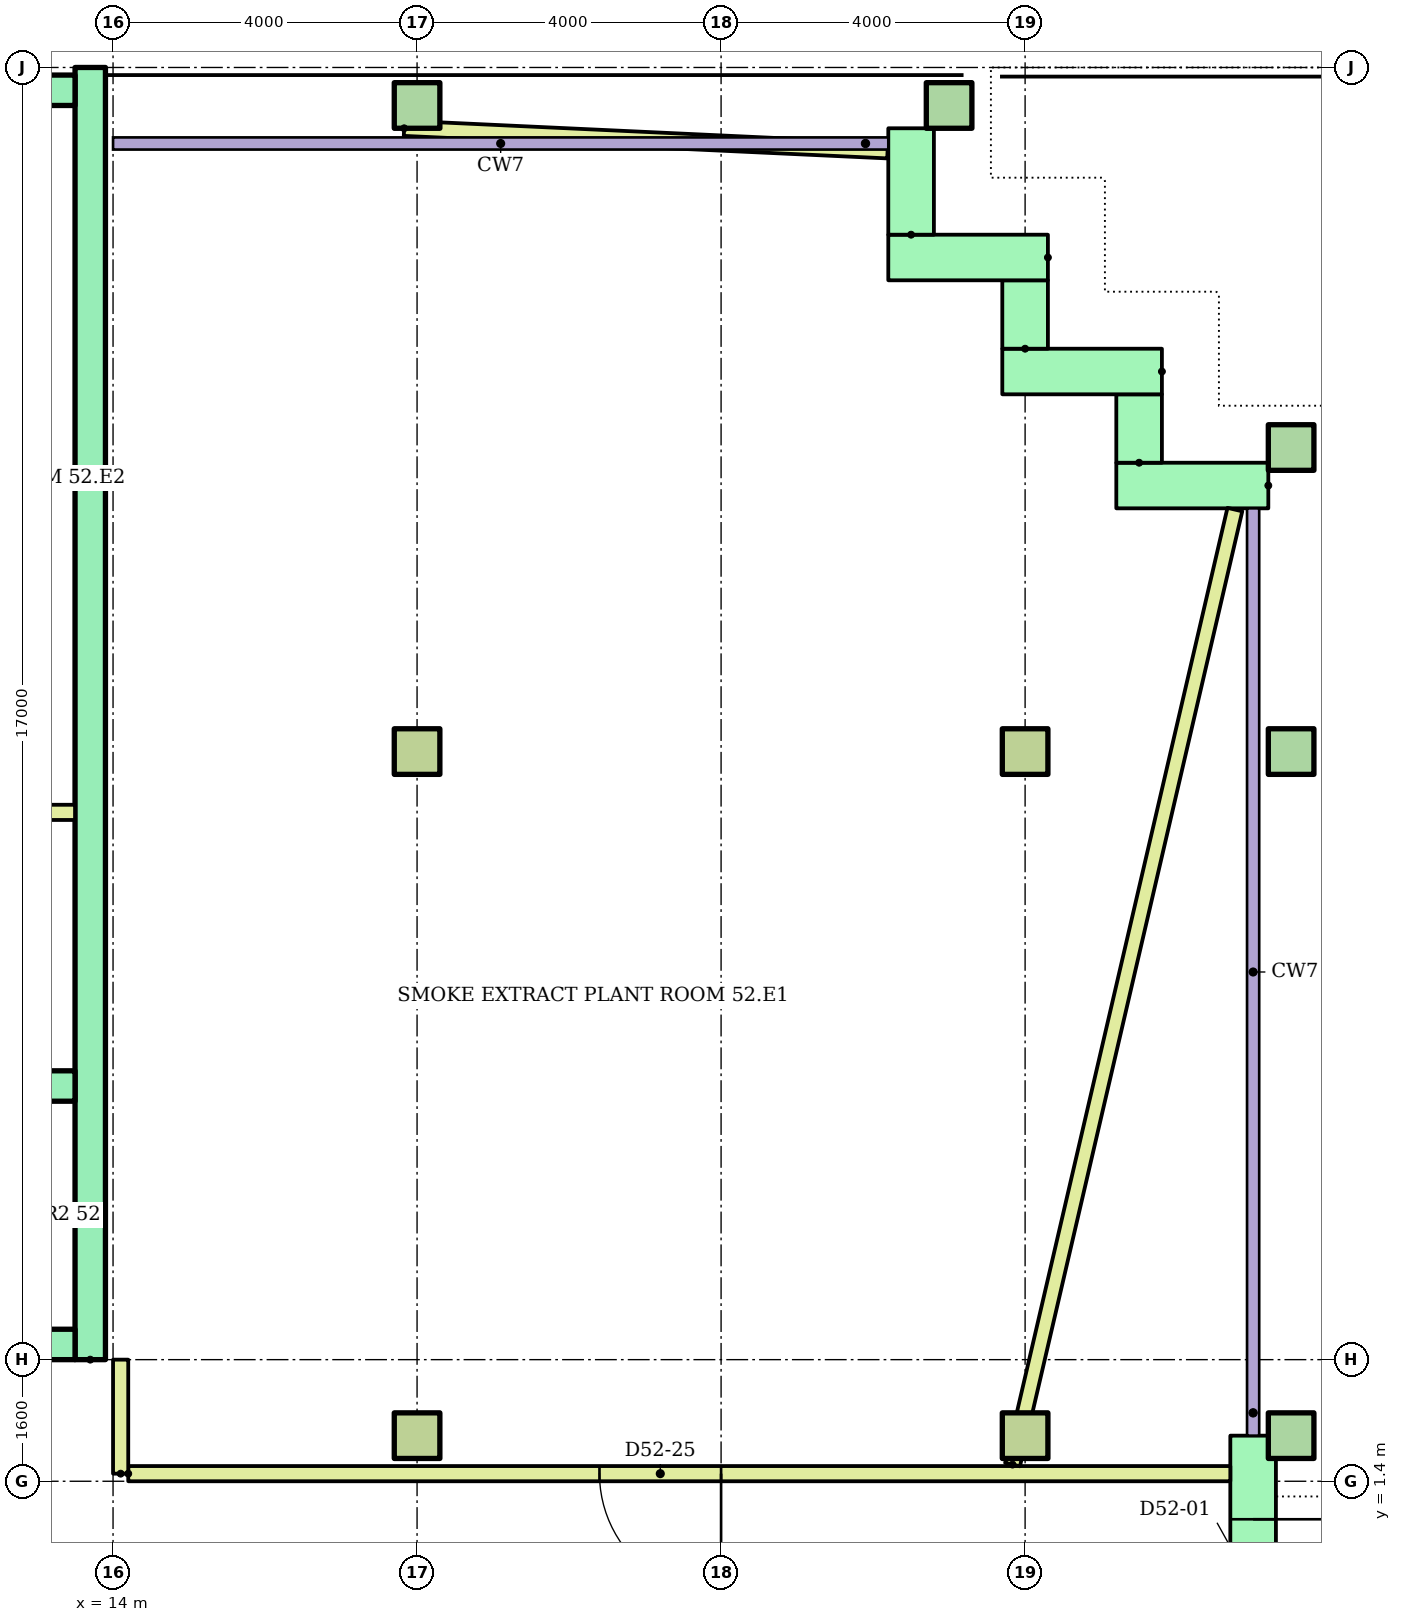
"""IFC4 building model, lengths in metres.
Left out: names, types, materials, properties, quantities, classifications, styles, units other than length and angle.
Written with IfcOpenShell. Run it as: python <this file> out.ifc"""

import sys

from ifc_helpers import new_model, si_unit, direction, frame, frame_2d, origin, origin_2d, place, context, subcontext, project, spatial, rectangle, hollow_rectangle, extrude, element, fill, save


model = new_model("IFC4")
c1 = context("Model", 3, precision=1e-05, world=origin(), true_north=direction((0.0, 1.0)))
c2 = subcontext(c1, "Body", "Model", "MODEL_VIEW")
j1 = project(units=[si_unit("LENGTHUNIT", "METRE"), si_unit("PLANEANGLEUNIT", "RADIAN")], contexts=[c1])
p1 = place(None, origin())
s1 = spatial("IfcSite", under=j1, at=p1, CompositionType="ELEMENT")
p2 = place(p1, origin())
s2 = spatial("IfcBuilding", under=s1, at=p2, CompositionType="ELEMENT")
p3 = place(p2, frame((0.0, 0.0, 203.7)))
s3 = spatial("IfcBuildingStorey", under=s2, at=p3, CompositionType="ELEMENT", Elevation=203.7)
for number, where in (
    (1, (18.0, 2.0, 0.0)),
    (2, (26.0, 2.0, 0.0)),
):
    element("IfcColumn", number, at=place(p3, frame(where)), inside=s3, PredefinedType="COLUMN", context=c2, shape_type="SweptSolid", body=[
        extrude(rectangle(XDim=0.6, YDim=0.6, at=origin_2d()), origin(), (0.0, 0.0, 1.0), 3.9),
    ])
p4 = place(p3, frame((29.5, 2.0, 0.0)))
e3 = element("IfcColumn", 3, at=p4, inside=s3, PredefinedType="COLUMN", context=c2, shape_type="SweptSolid", body=[
    extrude(hollow_rectangle(XDim=0.6, YDim=0.6, WallThickness=0.03, at=origin_2d()), origin(), (0.0, 0.0, 1.0), 3.9),
])
for number, where in (
    (4, (18.0, 11.0, 0.0)),
    (5, (26.0, 11.0, 0.0)),
):
    element("IfcColumn", number, at=place(p3, frame(where)), inside=s3, PredefinedType="COLUMN", context=c2, shape_type="SweptSolid", body=[
        extrude(rectangle(XDim=0.6, YDim=0.6, at=origin_2d()), origin(), (0.0, 0.0, 1.0), 3.9),
    ])
for number, where in (
    (6, (29.5, 11.0, 0.0)),
    (7, (29.5, 15.0, 0.0)),
    (8, (18.0, 19.5, 0.0)),
    (9, (25.0, 19.5, 0.0)),
):
    element("IfcColumn", number, at=place(p3, frame(where)), inside=s3, PredefinedType="COLUMN", context=c2, shape_type="SweptSolid", body=[
        extrude(hollow_rectangle(XDim=0.6, YDim=0.6, WallThickness=0.03, at=origin_2d()), origin(), (0.0, 0.0, 1.0), 3.9),
    ])
p5 = place(p3, frame((29.2, 14.5, 0.0), z_axis=(0.0, 0.0, 1.0), x_axis=(-1.0, 0.0, 0.0)))
e10 = element("IfcWall", 10, at=p5, inside=s3, PredefinedType="STANDARD", context=c2, shape_type="SweptSolid", body=[
    extrude(rectangle(XDim=2.0, YDim=0.6, at=frame_2d((1.0, 0.0))), origin(), (0.0, 0.0, 1.0), 3.62),
])
p6 = place(p3, frame((27.5, 14.8, 0.0), z_axis=(0.0, 0.0, 1.0), x_axis=(0.0, 1.0, 0.0)))
e11 = element("IfcWall", 11, at=p6, inside=s3, PredefinedType="STANDARD", context=c2, shape_type="SweptSolid", body=[
    extrude(rectangle(XDim=0.9, YDim=0.6, at=frame_2d((0.45, 0.0))), origin(), (0.0, 0.0, 1.0), 3.62),
])
p7 = place(p3, frame((27.8, 16.0, 0.0), z_axis=(0.0, 0.0, 1.0), x_axis=(-1.0, 0.0, 0.0)))
e12 = element("IfcWall", 12, at=p7, inside=s3, PredefinedType="STANDARD", context=c2, shape_type="SweptSolid", body=[
    extrude(rectangle(XDim=2.1, YDim=0.6, at=frame_2d((1.05, 0.0))), origin(), (0.0, 0.0, 1.0), 3.62),
])
p8 = place(p3, frame((26.0, 16.3, 0.0), z_axis=(0.0, 0.0, 1.0), x_axis=(0.0, 1.0, 0.0)))
e13 = element("IfcWall", 13, at=p8, inside=s3, PredefinedType="STANDARD", context=c2, shape_type="SweptSolid", body=[
    extrude(rectangle(XDim=0.9, YDim=0.6, at=frame_2d((0.45, 0.0))), origin(), (0.0, 0.0, 1.0), 3.62),
])
p9 = place(p3, frame((26.3, 17.5, 0.0), z_axis=(0.0, 0.0, 1.0), x_axis=(-1.0, 0.0, 0.0)))
e14 = element("IfcWall", 14, at=p9, inside=s3, PredefinedType="STANDARD", context=c2, shape_type="SweptSolid", body=[
    extrude(rectangle(XDim=2.1, YDim=0.6, at=frame_2d((1.05, 0.0))), origin(), (0.0, 0.0, 1.0), 3.62),
])
p10 = place(p3, frame((24.5, 17.8, 0.0), z_axis=(0.0, 0.0, 1.0), x_axis=(0.0, 1.0, 0.0)))
e15 = element("IfcWall", 15, at=p10, inside=s3, PredefinedType="STANDARD", context=c2, shape_type="SweptSolid", body=[
    extrude(rectangle(XDim=1.4, YDim=0.6, at=frame_2d((0.7, 0.0))), origin(), (0.0, 0.0, 1.0), 3.62),
])
p11 = place(p3, frame((29.0, -2.0, 0.0), z_axis=(0.0, 0.0, 1.0), x_axis=(0.0, 1.0, 0.0)))
e16 = element("IfcWall", 16, at=p11, inside=s3, PredefinedType="STANDARD", context=c2, shape_type="SweptSolid", body=[
    extrude(rectangle(XDim=4.0, YDim=0.6, at=frame_2d((2.0, 0.0))), origin(), (0.0, 0.0, 1.0), 3.62),
])
p12 = place(p11, frame((1.1, 0.0, 0.0)))
e17 = element("IfcOpeningElement", 17, at=p12, cuts=e16, PredefinedType="OPENING", context=c2, shape_type="SweptSolid", body=[
    extrude(rectangle(XDim=1.8, YDim=2.1, at=frame_2d((0.9, 1.05))), frame((0.0, 0.31, 0.0), z_axis=(0.0, -1.0, 0.0), x_axis=(1.0, 0.0, 0.0)), (0.0, 0.0, 1.0), 0.62),
])
p13 = place(p3, frame((13.7, 3.0, 0.0), z_axis=(0.0, 0.0, 1.0), x_axis=(0.0, 1.0, 0.0)))
e18 = element("IfcWall", 18, at=p13, inside=s3, PredefinedType="SHEAR", context=c2, shape_type="SweptSolid", body=[
    extrude(rectangle(XDim=17.0, YDim=0.4, at=frame_2d((8.5, 0.0))), origin(), (0.0, 0.0, 1.0), 3.62),
])
p14 = place(p3, frame((-13.5, 19.7, 0.0)))
e19 = element("IfcWall", 19, at=p14, inside=s3, PredefinedType="SHEAR", context=c2, shape_type="SweptSolid", body=[
    extrude(rectangle(XDim=27.0, YDim=0.4, at=frame_2d((13.5, 0.0))), origin(), (0.0, 0.0, 1.0), 3.62),
])
p15 = place(p3, frame((-13.5, 3.2, 0.0)))
e20 = element("IfcWall", 20, at=p15, inside=s3, PredefinedType="SHEAR", context=c2, shape_type="SweptSolid", body=[
    extrude(rectangle(XDim=27.0, YDim=0.4, at=frame_2d((13.5, 0.0))), origin(), (0.0, 0.0, 1.0), 3.62),
])
p16 = place(p15, frame((22.083, 0.0, 0.0)))
e21 = element("IfcOpeningElement", 21, at=p16, cuts=e20, PredefinedType="OPENING", context=c2, shape_type="SweptSolid", body=[
    extrude(rectangle(XDim=1.1, YDim=2.1, at=frame_2d((0.55, 1.05))), frame((0.0, 0.21, 0.0), z_axis=(0.0, -1.0, 0.0), x_axis=(1.0, 0.0, 0.0)), (0.0, 0.0, 1.0), 0.42),
])
p17 = place(p15, frame((25.128, 0.0, 0.0)))
e22 = element("IfcOpeningElement", 22, at=p17, cuts=e20, PredefinedType="OPENING", context=c2, shape_type="SweptSolid", body=[
    extrude(rectangle(XDim=1.1, YDim=2.1, at=frame_2d((0.55, 1.05))), frame((0.0, 0.21, 0.0), z_axis=(0.0, -1.0, 0.0), x_axis=(1.0, 0.0, 0.0)), (0.0, 0.0, 1.0), 0.42),
])
p18 = place(p15, frame((12.6, 0.0, 0.0)))
e23 = element("IfcOpeningElement", 23, at=p18, cuts=e20, PredefinedType="OPENING", context=c2, shape_type="SweptSolid", body=[
    extrude(rectangle(XDim=1.8, YDim=2.1, at=frame_2d((0.9, 1.05))), frame((0.0, 0.21, 0.0), z_axis=(0.0, -1.0, 0.0), x_axis=(1.0, 0.0, 0.0)), (0.0, 0.0, 1.0), 0.42),
])
p19 = place(p3, frame((1.522, 6.6, 0.0)))
e24 = element("IfcWall", 24, at=p19, inside=s3, PredefinedType="SHEAR", context=c2, shape_type="SweptSolid", body=[
    extrude(rectangle(XDim=11.978, YDim=0.4, at=frame_2d((5.989, 0.0))), origin(), (0.0, 0.0, 1.0), 3.62),
])
p20 = place(p19, frame((1.022, 0.0, 0.0)))
e25 = element("IfcOpeningElement", 25, at=p20, cuts=e24, PredefinedType="OPENING", context=c2, shape_type="SweptSolid", body=[
    extrude(rectangle(XDim=1.0, YDim=2.1, at=frame_2d((0.5, 1.05))), frame((0.0, 0.21, 0.0), z_axis=(0.0, -1.0, 0.0), x_axis=(1.0, 0.0, 0.0)), (0.0, 0.0, 1.0), 0.42),
])
p21 = place(p19, frame((4.067, 0.0, 0.0)))
e26 = element("IfcOpeningElement", 26, at=p21, cuts=e24, PredefinedType="OPENING", context=c2, shape_type="SweptSolid", body=[
    extrude(rectangle(XDim=1.0, YDim=2.1, at=frame_2d((0.5, 1.05))), frame((0.0, 0.21, 0.0), z_axis=(0.0, -1.0, 0.0), x_axis=(1.0, 0.0, 0.0)), (0.0, 0.0, 1.0), 0.42),
])
p22 = place(p3, frame((9.6, 10.2, 0.0)))
e27 = element("IfcWall", 27, at=p22, inside=s3, PredefinedType="PARTITIONING", context=c2, shape_type="SweptSolid", body=[
    extrude(rectangle(XDim=3.9, YDim=0.2, at=frame_2d((1.95, 0.0))), origin(), (0.0, 0.0, 1.0), 3.62),
])
p23 = place(p3, frame((14.2, 1.5, 0.0)))
e28 = element("IfcWall", 28, at=p23, inside=s3, PredefinedType="PARTITIONING", context=c2, shape_type="SweptSolid", body=[
    extrude(rectangle(XDim=14.5, YDim=0.2, at=frame_2d((7.25, 0.0))), origin(), (0.0, 0.0, 1.0), 3.62),
])
p24 = place(p23, frame((6.2, 0.0, 0.0)))
e29 = element("IfcOpeningElement", 29, at=p24, cuts=e28, PredefinedType="OPENING", context=c2, shape_type="SweptSolid", body=[
    extrude(rectangle(XDim=1.6, YDim=2.4, at=frame_2d((0.8, 1.2))), frame((0.0, 0.11, 0.0), z_axis=(0.0, -1.0, 0.0), x_axis=(1.0, 0.0, 0.0)), (0.0, 0.0, 1.0), 0.22),
])
p25 = place(p3, frame((14.1, 1.5, 0.0), z_axis=(0.0, 0.0, 1.0), x_axis=(0.0, 1.0, 0.0)))
e30 = element("IfcWall", 30, at=p25, inside=s3, PredefinedType="PARTITIONING", context=c2, shape_type="SweptSolid", body=[
    extrude(rectangle(XDim=1.5, YDim=0.2, at=frame_2d((0.75, 0.0))), origin(), (0.0, 0.0, 1.0), 3.62),
])
p26 = place(p3, frame((25.834, 1.619, 0.0), z_axis=(0.0, 0.0, 1.0), x_axis=(0.226758161526, 0.973951095375, 0.0)))
e31 = element("IfcWall", 31, at=p26, inside=s3, PredefinedType="PARTITIONING", context=c2, shape_type="SweptSolid", body=[
    extrude(rectangle(XDim=12.9, YDim=0.2, at=frame_2d((6.45, 0.0))), origin(), (0.0, 0.0, 1.0), 3.62),
])
p27 = place(p3, frame((17.83, 19.2, 0.0), z_axis=(0.0, 0.0, 1.0), x_axis=(0.998917891642, -0.046508555735, 0.0)))
e32 = element("IfcWall", 32, at=p27, inside=s3, PredefinedType="PARTITIONING", context=c2, shape_type="SweptSolid", body=[
    extrude(rectangle(XDim=6.367, YDim=0.2, at=frame_2d((3.184, 0.0))), origin(), (0.0, 0.0, 1.0), 3.62),
])
p28 = place(p12, frame((1.8, 0.0, 0.0), z_axis=(0.0, 0.0, 1.0), x_axis=(-1.0, 0.0, 0.0)))
e33 = element("IfcDoor", 33, at=p28, inside=s3, OperationType="DOUBLE_DOOR_SINGLE_SWING", PredefinedType="DOOR", context=c2, shape_type="SweptSolid", body=[
    extrude(rectangle(XDim=1.8, YDim=2.1, at=frame_2d((0.9, 1.05))), frame((0.0, 0.025, 0.0), z_axis=(0.0, -1.0, 0.0), x_axis=(1.0, 0.0, 0.0)), (0.0, 0.0, 1.0), 0.05),
])
fill(e17, e33)
p29 = place(p24, frame((1.6, 0.0, 0.0), z_axis=(0.0, 0.0, 1.0), x_axis=(-1.0, 0.0, 0.0)))
e34 = element("IfcDoor", 34, at=p29, inside=s3, OperationType="DOUBLE_DOOR_SINGLE_SWING", PredefinedType="DOOR", context=c2, shape_type="SweptSolid", body=[
    extrude(rectangle(XDim=1.6, YDim=2.4, at=frame_2d((0.8, 1.2))), frame((0.0, 0.025, 0.0), z_axis=(0.0, -1.0, 0.0), x_axis=(1.0, 0.0, 0.0)), (0.0, 0.0, 1.0), 0.05),
])
fill(e29, e34)
save(model, sys.argv[1])
